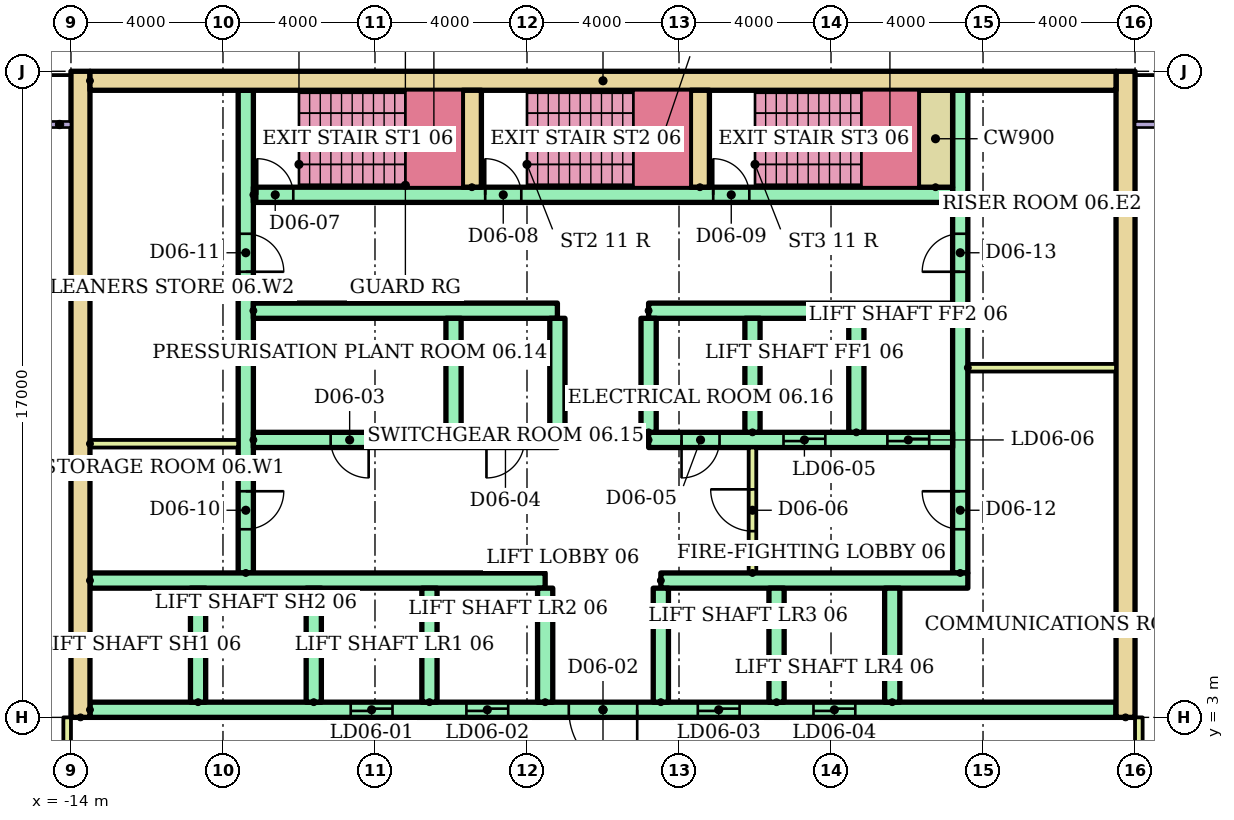
"""IFC4 building model, lengths in metres.
Left out: names, types, materials, properties, quantities, classifications, styles, units other than length and angle.
Written with IfcOpenShell. Run it as: python <this file> out.ifc"""

import sys

from ifc_helpers import new_model, si_unit, direction, frame, frame_2d, origin, place, context, subcontext, project, spatial, rectangle, extrude, element, fill, save


model = new_model("IFC4")
c1 = context("Model", 3, precision=1e-05, world=origin(), true_north=direction((0.0, 1.0)))
c2 = subcontext(c1, "Body", "Model", "MODEL_VIEW")
j1 = project(units=[si_unit("LENGTHUNIT", "METRE"), si_unit("PLANEANGLEUNIT", "RADIAN")], contexts=[c1])
p1 = place(None, origin())
s1 = spatial("IfcSite", under=j1, at=p1, CompositionType="ELEMENT")
p2 = place(p1, origin())
s2 = spatial("IfcBuilding", under=s1, at=p2, CompositionType="ELEMENT")
p3 = place(p2, frame((0.0, 0.0, 26.0)))
s3 = spatial("IfcBuildingStorey", under=s2, at=p3, CompositionType="ELEMENT", Elevation=26.0)
for number, where, z_axis, x_axis in (
    (1, (-13.75, 3.0, 0.0), (0.0, 0.0, 1.0), (0.0, 1.0, 0.0)),
    (2, (13.75, 3.0, 0.0), (0.0, 0.0, 1.0), (0.0, 1.0, 0.0)),
):
    element("IfcWall", number, at=place(p3, frame(where, z_axis=z_axis, x_axis=x_axis)), inside=s3, PredefinedType="SHEAR", context=c2, shape_type="SweptSolid", body=[
        extrude(rectangle(XDim=17.0, YDim=0.5, at=frame_2d((8.5, 0.0))), origin(), (0.0, 0.0, 1.0), 3.6),
    ])
p4 = place(p3, frame((-13.5, 19.75, 0.0)))
e3 = element("IfcWall", 3, at=p4, inside=s3, PredefinedType="SHEAR", context=c2, shape_type="SweptSolid", body=[
    extrude(rectangle(XDim=27.0, YDim=0.5, at=frame_2d((13.5, 0.0))), origin(), (0.0, 0.0, 1.0), 3.6),
])
p5 = place(p3, frame((-9.4, 6.8, 0.0), z_axis=(0.0, 0.0, 1.0), x_axis=(0.0, 1.0, 0.0)))
e4 = element("IfcWall", 4, at=p5, inside=s3, PredefinedType="SHEAR", context=c2, shape_type="SweptSolid", body=[
    extrude(rectangle(XDim=12.7, YDim=0.4, at=frame_2d((6.35, 0.0))), origin(), (0.0, 0.0, 1.0), 3.6),
])
p6 = place(p5, frame((1.15, 0.0, 0.0)))
e5 = element("IfcOpeningElement", 5, at=p6, cuts=e4, PredefinedType="OPENING", context=c2, shape_type="SweptSolid", body=[
    extrude(rectangle(XDim=1.0, YDim=2.1, at=frame_2d((0.5, 1.05))), frame((0.0, 0.21, 0.0), z_axis=(0.0, -1.0, 0.0), x_axis=(1.0, 0.0, 0.0)), (0.0, 0.0, 1.0), 0.42),
])
p7 = place(p5, frame((7.925, 0.0, 0.0)))
e6 = element("IfcOpeningElement", 6, at=p7, cuts=e4, PredefinedType="OPENING", context=c2, shape_type="SweptSolid", body=[
    extrude(rectangle(XDim=1.0, YDim=2.1, at=frame_2d((0.5, 1.05))), frame((0.0, 0.21, 0.0), z_axis=(0.0, -1.0, 0.0), x_axis=(1.0, 0.0, 0.0)), (0.0, 0.0, 1.0), 0.42),
])
p8 = place(p3, frame((9.4, 6.8, 0.0), z_axis=(0.0, 0.0, 1.0), x_axis=(0.0, 1.0, 0.0)))
e7 = element("IfcWall", 7, at=p8, inside=s3, PredefinedType="SHEAR", context=c2, shape_type="SweptSolid", body=[
    extrude(rectangle(XDim=12.7, YDim=0.4, at=frame_2d((6.35, 0.0))), origin(), (0.0, 0.0, 1.0), 3.6),
])
p9 = place(p8, frame((1.15, 0.0, 0.0)))
e8 = element("IfcOpeningElement", 8, at=p9, cuts=e7, PredefinedType="OPENING", context=c2, shape_type="SweptSolid", body=[
    extrude(rectangle(XDim=1.0, YDim=2.1, at=frame_2d((0.5, 1.05))), frame((0.0, 0.21, 0.0), z_axis=(0.0, -1.0, 0.0), x_axis=(1.0, 0.0, 0.0)), (0.0, 0.0, 1.0), 0.42),
])
p10 = place(p8, frame((7.925, 0.0, 0.0)))
e9 = element("IfcOpeningElement", 9, at=p10, cuts=e7, PredefinedType="OPENING", context=c2, shape_type="SweptSolid", body=[
    extrude(rectangle(XDim=1.0, YDim=2.1, at=frame_2d((0.5, 1.05))), frame((0.0, 0.21, 0.0), z_axis=(0.0, -1.0, 0.0), x_axis=(1.0, 0.0, 0.0)), (0.0, 0.0, 1.0), 0.42),
])
p11 = place(p3, frame((-13.5, 3.2, 0.0)))
e10 = element("IfcWall", 10, at=p11, inside=s3, PredefinedType="SHEAR", context=c2, shape_type="SweptSolid", body=[
    extrude(rectangle(XDim=27.0, YDim=0.4, at=frame_2d((13.5, 0.0))), origin(), (0.0, 0.0, 1.0), 3.6),
])
p12 = place(p11, frame((6.861, 0.0, 0.0)))
e11 = element("IfcOpeningElement", 11, at=p12, cuts=e10, PredefinedType="OPENING", context=c2, shape_type="SweptSolid", body=[
    extrude(rectangle(XDim=1.1, YDim=2.1, at=frame_2d((0.55, 1.05))), frame((0.0, 0.21, 0.0), z_axis=(0.0, -1.0, 0.0), x_axis=(1.0, 0.0, 0.0)), (0.0, 0.0, 1.0), 0.42),
])
p13 = place(p11, frame((9.906, 0.0, 0.0)))
e12 = element("IfcOpeningElement", 12, at=p13, cuts=e10, PredefinedType="OPENING", context=c2, shape_type="SweptSolid", body=[
    extrude(rectangle(XDim=1.1, YDim=2.1, at=frame_2d((0.55, 1.05))), frame((0.0, 0.21, 0.0), z_axis=(0.0, -1.0, 0.0), x_axis=(1.0, 0.0, 0.0)), (0.0, 0.0, 1.0), 0.42),
])
p14 = place(p11, frame((15.994, 0.0, 0.0)))
e13 = element("IfcOpeningElement", 13, at=p14, cuts=e10, PredefinedType="OPENING", context=c2, shape_type="SweptSolid", body=[
    extrude(rectangle(XDim=1.1, YDim=2.1, at=frame_2d((0.55, 1.05))), frame((0.0, 0.21, 0.0), z_axis=(0.0, -1.0, 0.0), x_axis=(1.0, 0.0, 0.0)), (0.0, 0.0, 1.0), 0.42),
])
p15 = place(p11, frame((19.039, 0.0, 0.0)))
e14 = element("IfcOpeningElement", 14, at=p15, cuts=e10, PredefinedType="OPENING", context=c2, shape_type="SweptSolid", body=[
    extrude(rectangle(XDim=1.1, YDim=2.1, at=frame_2d((0.55, 1.05))), frame((0.0, 0.21, 0.0), z_axis=(0.0, -1.0, 0.0), x_axis=(1.0, 0.0, 0.0)), (0.0, 0.0, 1.0), 0.42),
])
p16 = place(p11, frame((12.6, 0.0, 0.0)))
e15 = element("IfcOpeningElement", 15, at=p16, cuts=e10, PredefinedType="OPENING", context=c2, shape_type="SweptSolid", body=[
    extrude(rectangle(XDim=1.8, YDim=2.1, at=frame_2d((0.9, 1.05))), frame((0.0, 0.21, 0.0), z_axis=(0.0, -1.0, 0.0), x_axis=(1.0, 0.0, 0.0)), (0.0, 0.0, 1.0), 0.42),
])
p17 = place(p3, frame((-13.5, 6.6, 0.0)))
e16 = element("IfcWall", 16, at=p17, inside=s3, PredefinedType="SHEAR", context=c2, shape_type="SweptSolid", body=[
    extrude(rectangle(XDim=11.978, YDim=0.4, at=frame_2d((5.989, 0.0))), origin(), (0.0, 0.0, 1.0), 3.6),
])
p18 = place(p3, frame((1.522, 6.6, 0.0)))
e17 = element("IfcWall", 17, at=p18, inside=s3, PredefinedType="SHEAR", context=c2, shape_type="SweptSolid", body=[
    extrude(rectangle(XDim=8.078, YDim=0.4, at=frame_2d((4.039, 0.0))), origin(), (0.0, 0.0, 1.0), 3.6),
])
for number, where, z_axis, x_axis in (
    (18, (-10.656, 3.4, 0.0), (0.0, 0.0, 1.0), (0.0, 1.0, 0.0)),
    (19, (-7.611, 3.4, 0.0), (0.0, 0.0, 1.0), (0.0, 1.0, 0.0)),
    (20, (-4.567, 3.4, 0.0), (0.0, 0.0, 1.0), (0.0, 1.0, 0.0)),
    (21, (-1.522, 3.4, 0.0), (0.0, 0.0, 1.0), (0.0, 1.0, 0.0)),
    (22, (1.522, 3.4, 0.0), (0.0, 0.0, 1.0), (0.0, 1.0, 0.0)),
    (23, (4.567, 3.4, 0.0), (0.0, 0.0, 1.0), (0.0, 1.0, 0.0)),
    (24, (7.611, 3.4, 0.0), (0.0, 0.0, 1.0), (0.0, 1.0, 0.0)),
):
    element("IfcWall", number, at=place(p3, frame(where, z_axis=z_axis, x_axis=x_axis)), inside=s3, PredefinedType="SHEAR", context=c2, shape_type="SweptSolid", body=[
        extrude(rectangle(XDim=3.0, YDim=0.4, at=frame_2d((1.5, 0.0))), origin(), (0.0, 0.0, 1.0), 3.6),
    ])
p19 = place(p3, frame((-9.2, 10.3, 0.0)))
e25 = element("IfcWall", 25, at=p19, inside=s3, PredefinedType="SHEAR", context=c2, shape_type="SweptSolid", body=[
    extrude(rectangle(XDim=8.0, YDim=0.4, at=frame_2d((4.0, 0.0))), origin(), (0.0, 0.0, 1.0), 3.6),
])
p20 = place(p19, frame((2.033, 0.0, 0.0)))
e26 = element("IfcOpeningElement", 26, at=p20, cuts=e25, PredefinedType="OPENING", context=c2, shape_type="SweptSolid", body=[
    extrude(rectangle(XDim=1.0, YDim=2.1, at=frame_2d((0.5, 1.05))), frame((0.0, 0.21, 0.0), z_axis=(0.0, -1.0, 0.0), x_axis=(1.0, 0.0, 0.0)), (0.0, 0.0, 1.0), 0.42),
])
p21 = place(p19, frame((6.133, 0.0, 0.0)))
e27 = element("IfcOpeningElement", 27, at=p21, cuts=e25, PredefinedType="OPENING", context=c2, shape_type="SweptSolid", body=[
    extrude(rectangle(XDim=1.0, YDim=2.1, at=frame_2d((0.5, 1.05))), frame((0.0, 0.21, 0.0), z_axis=(0.0, -1.0, 0.0), x_axis=(1.0, 0.0, 0.0)), (0.0, 0.0, 1.0), 0.42),
])
p22 = place(p3, frame((-9.2, 13.7, 0.0)))
e28 = element("IfcWall", 28, at=p22, inside=s3, PredefinedType="SHEAR", context=c2, shape_type="SweptSolid", body=[
    extrude(rectangle(XDim=8.0, YDim=0.4, at=frame_2d((4.0, 0.0))), origin(), (0.0, 0.0, 1.0), 3.6),
])
p23 = place(p3, frame((1.2, 10.3, 0.0)))
e29 = element("IfcWall", 29, at=p23, inside=s3, PredefinedType="SHEAR", context=c2, shape_type="SweptSolid", body=[
    extrude(rectangle(XDim=8.0, YDim=0.4, at=frame_2d((4.0, 0.0))), origin(), (0.0, 0.0, 1.0), 3.6),
])
p24 = place(p23, frame((3.55, 0.0, 0.0)))
e30 = element("IfcOpeningElement", 30, at=p24, cuts=e29, PredefinedType="OPENING", context=c2, shape_type="SweptSolid", body=[
    extrude(rectangle(XDim=1.1, YDim=2.1, at=frame_2d((0.55, 1.05))), frame((0.0, 0.21, 0.0), z_axis=(0.0, -1.0, 0.0), x_axis=(1.0, 0.0, 0.0)), (0.0, 0.0, 1.0), 0.42),
])
p25 = place(p23, frame((6.283, 0.0, 0.0)))
e31 = element("IfcOpeningElement", 31, at=p25, cuts=e29, PredefinedType="OPENING", context=c2, shape_type="SweptSolid", body=[
    extrude(rectangle(XDim=1.1, YDim=2.1, at=frame_2d((0.55, 1.05))), frame((0.0, 0.21, 0.0), z_axis=(0.0, -1.0, 0.0), x_axis=(1.0, 0.0, 0.0)), (0.0, 0.0, 1.0), 0.42),
])
p26 = place(p23, frame((0.867, 0.0, 0.0)))
e32 = element("IfcOpeningElement", 32, at=p26, cuts=e29, PredefinedType="OPENING", context=c2, shape_type="SweptSolid", body=[
    extrude(rectangle(XDim=1.0, YDim=2.1, at=frame_2d((0.5, 1.05))), frame((0.0, 0.21, 0.0), z_axis=(0.0, -1.0, 0.0), x_axis=(1.0, 0.0, 0.0)), (0.0, 0.0, 1.0), 0.42),
])
p27 = place(p3, frame((1.2, 13.7, 0.0)))
e33 = element("IfcWall", 33, at=p27, inside=s3, PredefinedType="SHEAR", context=c2, shape_type="SweptSolid", body=[
    extrude(rectangle(XDim=8.0, YDim=0.4, at=frame_2d((4.0, 0.0))), origin(), (0.0, 0.0, 1.0), 3.6),
])
for number, where, z_axis, x_axis in (
    (34, (-3.933, 10.5, 0.0), (0.0, 0.0, 1.0), (0.0, 1.0, 0.0)),
    (35, (-1.2, 10.5, 0.0), (0.0, 0.0, 1.0), (0.0, 1.0, 0.0)),
    (36, (1.2, 10.5, 0.0), (0.0, 0.0, 1.0), (0.0, 1.0, 0.0)),
    (37, (3.933, 10.5, 0.0), (0.0, 0.0, 1.0), (0.0, 1.0, 0.0)),
    (38, (6.667, 10.5, 0.0), (0.0, 0.0, 1.0), (0.0, 1.0, 0.0)),
):
    element("IfcWall", number, at=place(p3, frame(where, z_axis=z_axis, x_axis=x_axis)), inside=s3, PredefinedType="SHEAR", context=c2, shape_type="SweptSolid", body=[
        extrude(rectangle(XDim=3.0, YDim=0.4, at=frame_2d((1.5, 0.0))), origin(), (0.0, 0.0, 1.0), 3.6),
    ])
p28 = place(p3, frame((3.933, 6.8, 0.0), z_axis=(0.0, 0.0, 1.0), x_axis=(0.0, 1.0, 0.0)))
e39 = element("IfcWall", 39, at=p28, inside=s3, PredefinedType="PARTITIONING", context=c2, shape_type="SweptSolid", body=[
    extrude(rectangle(XDim=3.3, YDim=0.2, at=frame_2d((1.65, 0.0))), origin(), (0.0, 0.0, 1.0), 3.6),
])
p29 = place(p28, frame((1.1, 0.0, 0.0)))
e40 = element("IfcOpeningElement", 40, at=p29, cuts=e39, PredefinedType="OPENING", context=c2, shape_type="SweptSolid", body=[
    extrude(rectangle(XDim=1.1, YDim=2.1, at=frame_2d((0.55, 1.05))), frame((0.0, 0.11, 0.0), z_axis=(0.0, -1.0, 0.0), x_axis=(1.0, 0.0, 0.0)), (0.0, 0.0, 1.0), 0.22),
])
p30 = place(p3, frame((-9.2, 16.75, 0.0)))
e41 = element("IfcWall", 41, at=p30, inside=s3, PredefinedType="SHEAR", context=c2, shape_type="SweptSolid", body=[
    extrude(rectangle(XDim=18.4, YDim=0.4, at=frame_2d((9.2, 0.0))), origin(), (0.0, 0.0, 1.0), 3.6),
])
p31 = place(p30, frame((0.1, 0.0, 0.0)))
e42 = element("IfcOpeningElement", 42, at=p31, cuts=e41, PredefinedType="OPENING", context=c2, shape_type="SweptSolid", body=[
    extrude(rectangle(XDim=0.95, YDim=2.1, at=frame_2d((0.475, 1.05))), frame((0.0, 0.21, 0.0), z_axis=(0.0, -1.0, 0.0), x_axis=(1.0, 0.0, 0.0)), (0.0, 0.0, 1.0), 0.42),
])
p32 = place(p30, frame((6.1, 0.0, 0.0)))
e43 = element("IfcOpeningElement", 43, at=p32, cuts=e41, PredefinedType="OPENING", context=c2, shape_type="SweptSolid", body=[
    extrude(rectangle(XDim=0.95, YDim=2.1, at=frame_2d((0.475, 1.05))), frame((0.0, 0.21, 0.0), z_axis=(0.0, -1.0, 0.0), x_axis=(1.0, 0.0, 0.0)), (0.0, 0.0, 1.0), 0.42),
])
p33 = place(p30, frame((12.1, 0.0, 0.0)))
e44 = element("IfcOpeningElement", 44, at=p33, cuts=e41, PredefinedType="OPENING", context=c2, shape_type="SweptSolid", body=[
    extrude(rectangle(XDim=0.95, YDim=2.1, at=frame_2d((0.475, 1.05))), frame((0.0, 0.21, 0.0), z_axis=(0.0, -1.0, 0.0), x_axis=(1.0, 0.0, 0.0)), (0.0, 0.0, 1.0), 0.42),
])
for number, where, z_axis, x_axis in (
    (45, (-3.45, 16.95, 0.0), (0.0, 0.0, 1.0), (0.0, 1.0, 0.0)),
    (46, (2.55, 16.95, 0.0), (0.0, 0.0, 1.0), (0.0, 1.0, 0.0)),
):
    element("IfcWall", number, at=place(p3, frame(where, z_axis=z_axis, x_axis=x_axis)), inside=s3, PredefinedType="SHEAR", context=c2, shape_type="SweptSolid", body=[
        extrude(rectangle(XDim=2.55, YDim=0.5, at=frame_2d((1.275, 0.0))), origin(), (0.0, 0.0, 1.0), 3.6),
    ])
p34 = place(p3, frame((8.75, 16.95, 0.0), z_axis=(0.0, 0.0, 1.0), x_axis=(0.0, 1.0, 0.0)))
e47 = element("IfcWall", 47, at=p34, inside=s3, PredefinedType="SHEAR", context=c2, shape_type="SweptSolid", body=[
    extrude(rectangle(XDim=2.55, YDim=0.9, at=frame_2d((1.275, 0.0))), origin(), (0.0, 0.0, 1.0), 3.6),
])
for number, where in (
    (48, (-13.5, 10.2, 0.0)),
    (49, (9.6, 12.2, 0.0)),
):
    element("IfcWall", number, at=place(p3, frame(where)), inside=s3, PredefinedType="PARTITIONING", context=c2, shape_type="SweptSolid", body=[
        extrude(rectangle(XDim=3.9, YDim=0.2, at=frame_2d((1.95, 0.0))), origin(), (0.0, 0.0, 1.0), 3.6),
    ])
for number, where, z_axis, x_axis in (
    (50, (-14.1, 1.5, 0.0), (0.0, 0.0, 1.0), (0.0, 1.0, 0.0)),
    (51, (14.1, 1.5, 0.0), (0.0, 0.0, 1.0), (0.0, 1.0, 0.0)),
):
    element("IfcWall", number, at=place(p3, frame(where, z_axis=z_axis, x_axis=x_axis)), inside=s3, PredefinedType="PARTITIONING", context=c2, shape_type="SweptSolid", body=[
        extrude(rectangle(XDim=1.5, YDim=0.2, at=frame_2d((0.75, 0.0))), origin(), (0.0, 0.0, 1.0), 3.6),
    ])
p35 = place(p12, origin())
e52 = element("IfcDoor", 52, at=p35, inside=s3, OperationType="SLIDING_TO_LEFT", PredefinedType="DOOR", context=c2, shape_type="SweptSolid", body=[
    extrude(rectangle(XDim=1.1, YDim=2.1, at=frame_2d((0.55, 1.05))), frame((0.0, 0.025, 0.0), z_axis=(0.0, -1.0, 0.0), x_axis=(1.0, 0.0, 0.0)), (0.0, 0.0, 1.0), 0.05),
])
fill(e11, e52)
p36 = place(p13, origin())
e53 = element("IfcDoor", 53, at=p36, inside=s3, OperationType="SLIDING_TO_LEFT", PredefinedType="DOOR", context=c2, shape_type="SweptSolid", body=[
    extrude(rectangle(XDim=1.1, YDim=2.1, at=frame_2d((0.55, 1.05))), frame((0.0, 0.025, 0.0), z_axis=(0.0, -1.0, 0.0), x_axis=(1.0, 0.0, 0.0)), (0.0, 0.0, 1.0), 0.05),
])
fill(e12, e53)
p37 = place(p14, origin())
e54 = element("IfcDoor", 54, at=p37, inside=s3, OperationType="SLIDING_TO_LEFT", PredefinedType="DOOR", context=c2, shape_type="SweptSolid", body=[
    extrude(rectangle(XDim=1.1, YDim=2.1, at=frame_2d((0.55, 1.05))), frame((0.0, 0.025, 0.0), z_axis=(0.0, -1.0, 0.0), x_axis=(1.0, 0.0, 0.0)), (0.0, 0.0, 1.0), 0.05),
])
fill(e13, e54)
p38 = place(p15, origin())
e55 = element("IfcDoor", 55, at=p38, inside=s3, OperationType="SLIDING_TO_LEFT", PredefinedType="DOOR", context=c2, shape_type="SweptSolid", body=[
    extrude(rectangle(XDim=1.1, YDim=2.1, at=frame_2d((0.55, 1.05))), frame((0.0, 0.025, 0.0), z_axis=(0.0, -1.0, 0.0), x_axis=(1.0, 0.0, 0.0)), (0.0, 0.0, 1.0), 0.05),
])
fill(e14, e55)
p39 = place(p16, frame((1.8, 0.0, 0.0), z_axis=(0.0, 0.0, 1.0), x_axis=(-1.0, 0.0, 0.0)))
e56 = element("IfcDoor", 56, at=p39, inside=s3, OperationType="DOUBLE_DOOR_SINGLE_SWING", PredefinedType="DOOR", context=c2, shape_type="SweptSolid", body=[
    extrude(rectangle(XDim=1.8, YDim=2.1, at=frame_2d((0.9, 1.05))), frame((0.0, 0.025, 0.0), z_axis=(0.0, -1.0, 0.0), x_axis=(1.0, 0.0, 0.0)), (0.0, 0.0, 1.0), 0.05),
])
fill(e15, e56)
p40 = place(p24, origin())
e57 = element("IfcDoor", 57, at=p40, inside=s3, OperationType="SLIDING_TO_LEFT", PredefinedType="DOOR", context=c2, shape_type="SweptSolid", body=[
    extrude(rectangle(XDim=1.1, YDim=2.1, at=frame_2d((0.55, 1.05))), frame((0.0, 0.025, 0.0), z_axis=(0.0, -1.0, 0.0), x_axis=(1.0, 0.0, 0.0)), (0.0, 0.0, 1.0), 0.05),
])
fill(e30, e57)
p41 = place(p25, origin())
e58 = element("IfcDoor", 58, at=p41, inside=s3, OperationType="SLIDING_TO_LEFT", PredefinedType="DOOR", context=c2, shape_type="SweptSolid", body=[
    extrude(rectangle(XDim=1.1, YDim=2.1, at=frame_2d((0.55, 1.05))), frame((0.0, 0.025, 0.0), z_axis=(0.0, -1.0, 0.0), x_axis=(1.0, 0.0, 0.0)), (0.0, 0.0, 1.0), 0.05),
])
fill(e31, e58)
p42 = place(p20, frame((1.0, 0.0, 0.0), z_axis=(0.0, 0.0, 1.0), x_axis=(-1.0, 0.0, 0.0)))
e59 = element("IfcDoor", 59, at=p42, inside=s3, OperationType="SINGLE_SWING_RIGHT", PredefinedType="DOOR", context=c2, shape_type="SweptSolid", body=[
    extrude(rectangle(XDim=1.0, YDim=2.1, at=frame_2d((0.5, 1.05))), frame((0.0, 0.025, 0.0), z_axis=(0.0, -1.0, 0.0), x_axis=(1.0, 0.0, 0.0)), (0.0, 0.0, 1.0), 0.05),
])
fill(e26, e59)
p43 = place(p21, frame((1.0, 0.0, 0.0), z_axis=(0.0, 0.0, 1.0), x_axis=(-1.0, 0.0, 0.0)))
e60 = element("IfcDoor", 60, at=p43, inside=s3, OperationType="SINGLE_SWING_LEFT", PredefinedType="DOOR", context=c2, shape_type="SweptSolid", body=[
    extrude(rectangle(XDim=1.0, YDim=2.1, at=frame_2d((0.5, 1.05))), frame((0.0, 0.025, 0.0), z_axis=(0.0, -1.0, 0.0), x_axis=(1.0, 0.0, 0.0)), (0.0, 0.0, 1.0), 0.05),
])
fill(e27, e60)
p44 = place(p26, frame((1.0, 0.0, 0.0), z_axis=(0.0, 0.0, 1.0), x_axis=(-1.0, 0.0, 0.0)))
e61 = element("IfcDoor", 61, at=p44, inside=s3, OperationType="SINGLE_SWING_LEFT", PredefinedType="DOOR", context=c2, shape_type="SweptSolid", body=[
    extrude(rectangle(XDim=1.0, YDim=2.1, at=frame_2d((0.5, 1.05))), frame((0.0, 0.025, 0.0), z_axis=(0.0, -1.0, 0.0), x_axis=(1.0, 0.0, 0.0)), (0.0, 0.0, 1.0), 0.05),
])
fill(e32, e61)
p45 = place(p29, origin())
e62 = element("IfcDoor", 62, at=p45, inside=s3, OperationType="SINGLE_SWING_RIGHT", PredefinedType="DOOR", context=c2, shape_type="SweptSolid", body=[
    extrude(rectangle(XDim=1.1, YDim=2.1, at=frame_2d((0.55, 1.05))), frame((0.0, 0.025, 0.0), z_axis=(0.0, -1.0, 0.0), x_axis=(1.0, 0.0, 0.0)), (0.0, 0.0, 1.0), 0.05),
])
fill(e40, e62)
p46 = place(p31, origin())
e63 = element("IfcDoor", 63, at=p46, inside=s3, OperationType="SINGLE_SWING_LEFT", PredefinedType="DOOR", context=c2, shape_type="SweptSolid", body=[
    extrude(rectangle(XDim=0.95, YDim=2.1, at=frame_2d((0.475, 1.05))), frame((0.0, 0.025, 0.0), z_axis=(0.0, -1.0, 0.0), x_axis=(1.0, 0.0, 0.0)), (0.0, 0.0, 1.0), 0.05),
])
fill(e42, e63)
p47 = place(p32, origin())
e64 = element("IfcDoor", 64, at=p47, inside=s3, OperationType="SINGLE_SWING_LEFT", PredefinedType="DOOR", context=c2, shape_type="SweptSolid", body=[
    extrude(rectangle(XDim=0.95, YDim=2.1, at=frame_2d((0.475, 1.05))), frame((0.0, 0.025, 0.0), z_axis=(0.0, -1.0, 0.0), x_axis=(1.0, 0.0, 0.0)), (0.0, 0.0, 1.0), 0.05),
])
fill(e43, e64)
p48 = place(p33, origin())
e65 = element("IfcDoor", 65, at=p48, inside=s3, OperationType="SINGLE_SWING_LEFT", PredefinedType="DOOR", context=c2, shape_type="SweptSolid", body=[
    extrude(rectangle(XDim=0.95, YDim=2.1, at=frame_2d((0.475, 1.05))), frame((0.0, 0.025, 0.0), z_axis=(0.0, -1.0, 0.0), x_axis=(1.0, 0.0, 0.0)), (0.0, 0.0, 1.0), 0.05),
])
fill(e44, e65)
p49 = place(p6, frame((1.0, 0.0, 0.0), z_axis=(0.0, 0.0, 1.0), x_axis=(-1.0, 0.0, 0.0)))
e66 = element("IfcDoor", 66, at=p49, inside=s3, OperationType="SINGLE_SWING_RIGHT", PredefinedType="DOOR", context=c2, shape_type="SweptSolid", body=[
    extrude(rectangle(XDim=1.0, YDim=2.1, at=frame_2d((0.5, 1.05))), frame((0.0, 0.025, 0.0), z_axis=(0.0, -1.0, 0.0), x_axis=(1.0, 0.0, 0.0)), (0.0, 0.0, 1.0), 0.05),
])
fill(e5, e66)
p50 = place(p7, frame((1.0, 0.0, 0.0), z_axis=(0.0, 0.0, 1.0), x_axis=(-1.0, 0.0, 0.0)))
e67 = element("IfcDoor", 67, at=p50, inside=s3, OperationType="SINGLE_SWING_LEFT", PredefinedType="DOOR", context=c2, shape_type="SweptSolid", body=[
    extrude(rectangle(XDim=1.0, YDim=2.1, at=frame_2d((0.5, 1.05))), frame((0.0, 0.025, 0.0), z_axis=(0.0, -1.0, 0.0), x_axis=(1.0, 0.0, 0.0)), (0.0, 0.0, 1.0), 0.05),
])
fill(e6, e67)
p51 = place(p9, origin())
e68 = element("IfcDoor", 68, at=p51, inside=s3, OperationType="SINGLE_SWING_RIGHT", PredefinedType="DOOR", context=c2, shape_type="SweptSolid", body=[
    extrude(rectangle(XDim=1.0, YDim=2.1, at=frame_2d((0.5, 1.05))), frame((0.0, 0.025, 0.0), z_axis=(0.0, -1.0, 0.0), x_axis=(1.0, 0.0, 0.0)), (0.0, 0.0, 1.0), 0.05),
])
fill(e8, e68)
p52 = place(p10, origin())
e69 = element("IfcDoor", 69, at=p52, inside=s3, OperationType="SINGLE_SWING_LEFT", PredefinedType="DOOR", context=c2, shape_type="SweptSolid", body=[
    extrude(rectangle(XDim=1.0, YDim=2.1, at=frame_2d((0.5, 1.05))), frame((0.0, 0.025, 0.0), z_axis=(0.0, -1.0, 0.0), x_axis=(1.0, 0.0, 0.0)), (0.0, 0.0, 1.0), 0.05),
])
fill(e9, e69)
save(model, sys.argv[1])
